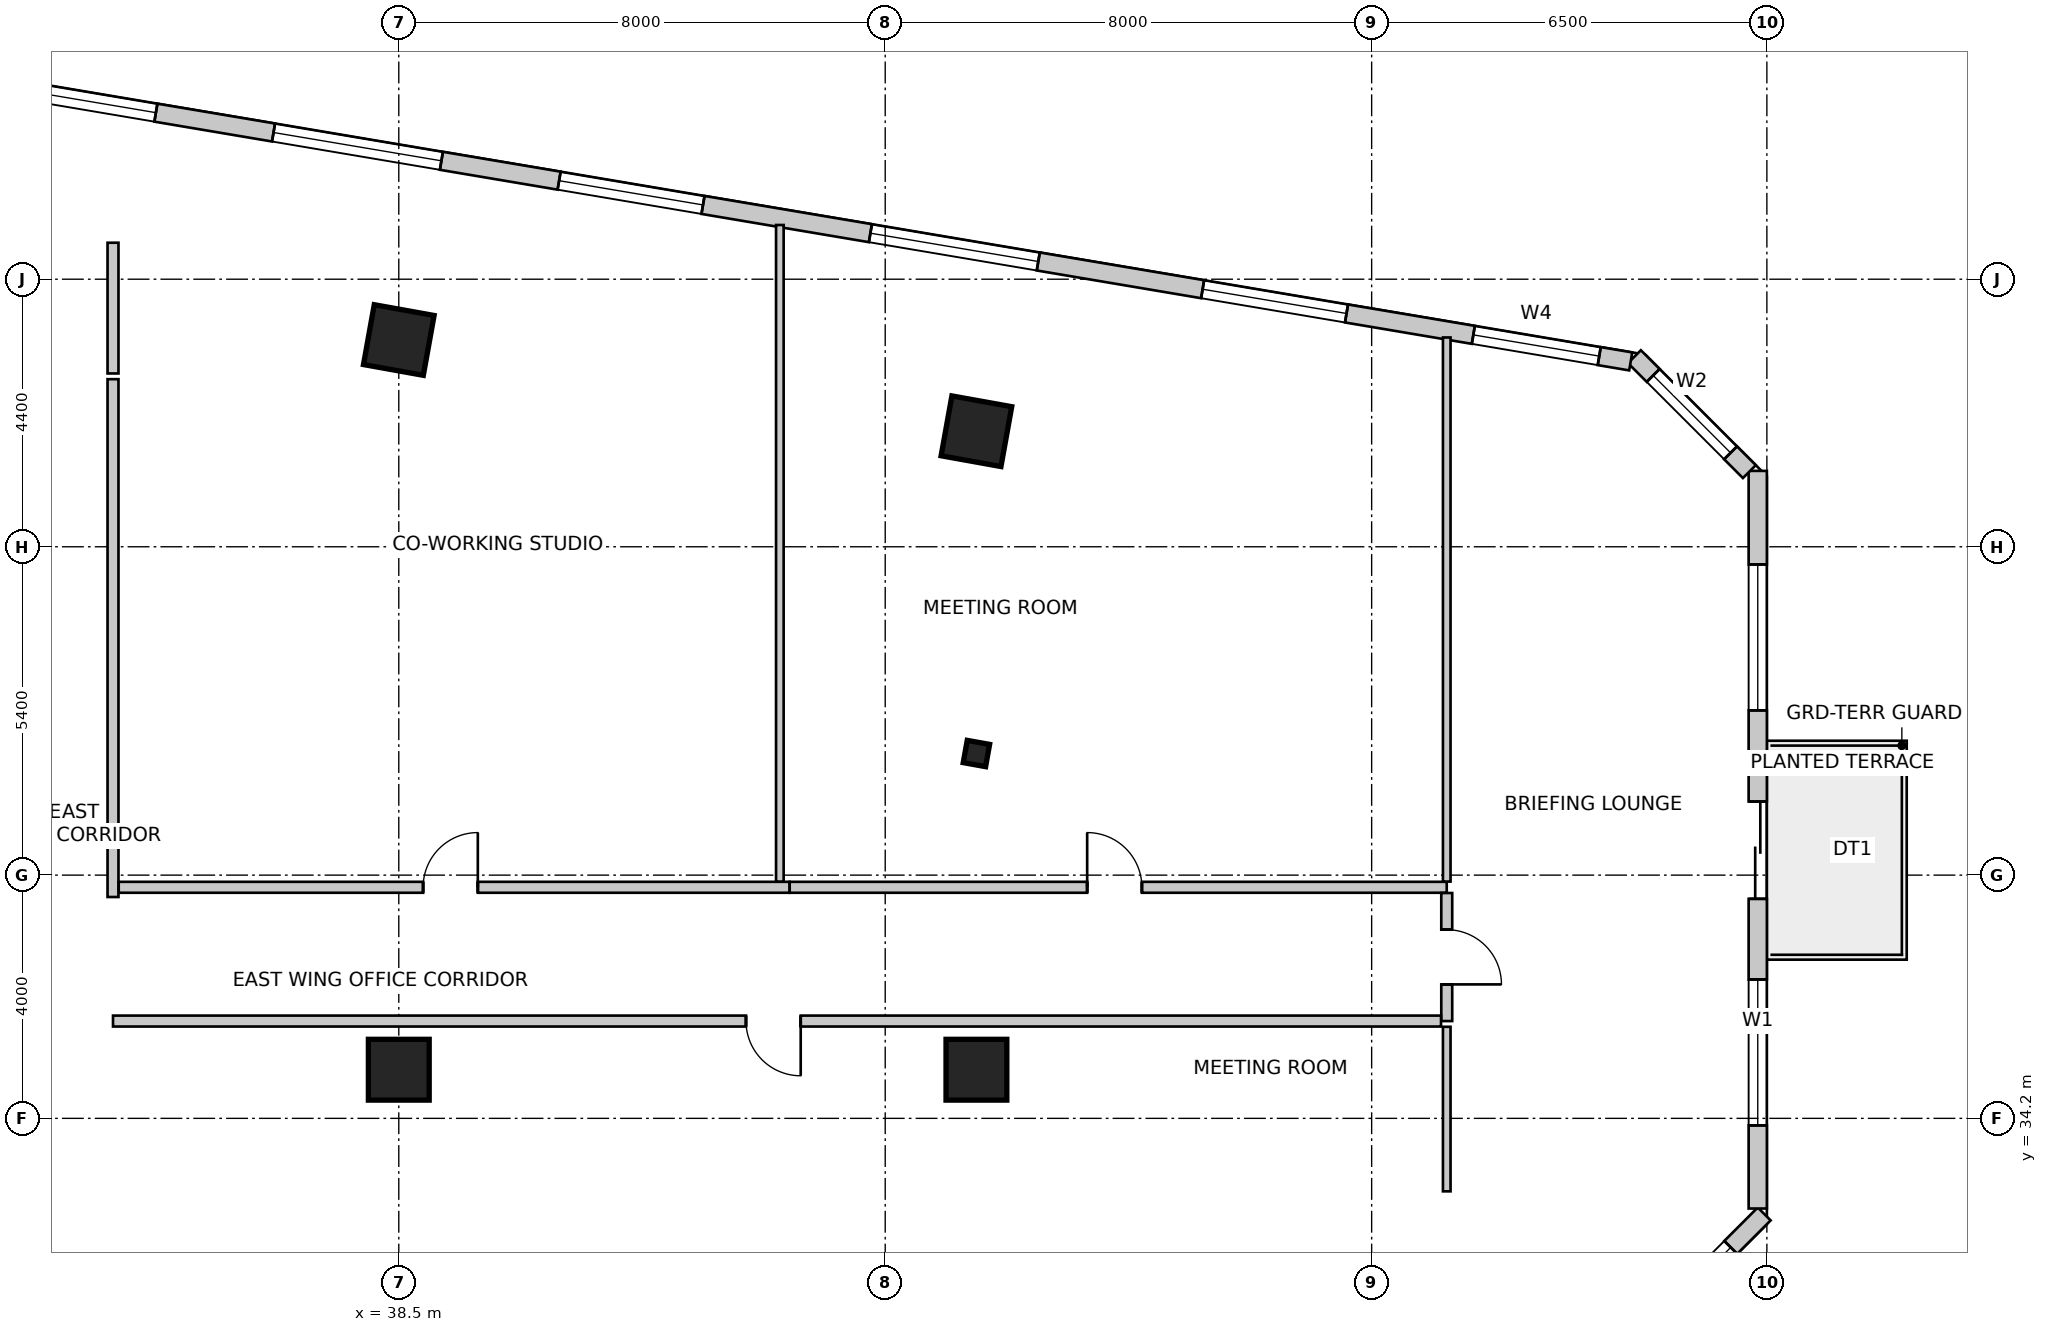
"""IFC4 building model, lengths in metres.
Left out: names, types, materials, properties, quantities, classifications, styles, units other than length and angle.
Written with IfcOpenShell. Run it as: python <this file> out.ifc"""

import sys

from ifc_helpers import new_model, si_unit, direction, frame, frame_2d, origin, origin_2d, place, context, subcontext, project, spatial, rectangle, i_section, extrude, source, transform, mapped, element, fill, save


model = new_model("IFC4")
c1 = context("Model", 3, precision=1e-05, world=origin(), true_north=direction((0.0, 1.0)))
c2 = subcontext(c1, "Body", "Model", "MODEL_VIEW")
j1 = project(units=[si_unit("LENGTHUNIT", "METRE"), si_unit("PLANEANGLEUNIT", "RADIAN")], contexts=[c1])
p1 = place(None, origin())
s1 = spatial("IfcSite", under=j1, at=p1, CompositionType="ELEMENT")
p2 = place(p1, origin())
s2 = spatial("IfcBuilding", under=s1, at=p2, CompositionType="ELEMENT")
p3 = place(p2, frame((0.0, 0.0, 31.0)))
s3 = spatial("IfcBuildingStorey", under=s2, at=p3, CompositionType="ELEMENT", Elevation=31.0)
m1 = source(origin(), c2, "Body", "SweptSolid", [
    extrude(rectangle(XDim=1.0, YDim=1.0, at=origin_2d()), origin(), (0.0, 0.0, 1.0), 4.0),
])
for number, where, z_axis, x_axis in (
    (1, (38.5, 47.0, 0.0), (0.0, 0.0, 1.0), (0.984, -0.177, 0.0)),
    (2, (48.0, 45.5, 0.0), (0.0, 0.0, 1.0), (0.984, -0.177, 0.0)),
    (3, (38.5, 35.0, 0.0), (0.0, 0.0, 1.0), (1.0, 0.0, 0.0)),
    (4, (48.0, 35.0, 0.0), (0.0, 0.0, 1.0), (1.0, 0.0, 0.0)),
):
    element("IfcColumn", number, at=place(p3, frame(where, z_axis=z_axis, x_axis=x_axis)), inside=s3, PredefinedType="COLUMN", context=c2, shape_type="MappedRepresentation", body=[
        mapped(m1, transform((0.0, 0.0, 0.0), scale=1.0)),
    ])
m2 = source(origin(), c2, "Body", "SweptSolid", [
    extrude(i_section(OverallWidth=0.374, OverallDepth=0.372, WebThickness=0.016, FlangeThickness=0.026, FilletRadius=0.015, at=origin_2d()), origin(), (0.0, 0.0, 1.0), 4.0),
])
p4 = place(p3, frame((48.0, 40.2, 0.0), z_axis=(0.0, 0.0, 1.0), x_axis=(0.984195607969, -0.17708474032, 0.0)))
e5 = element("IfcColumn", 5, at=p4, inside=s3, PredefinedType="COLUMN", context=c2, shape_type="MappedRepresentation", body=[
    mapped(m2, transform((0.0, 0.0, 0.0), scale=1.0)),
])
p5 = place(p3, frame((57.876, 29.548, 0.0), z_axis=(0.0, 0.0, 1.0), x_axis=(0.707106781187, 0.707106781187, 0.0)))
e6 = element("IfcWall", 6, at=p5, inside=s3, PredefinedType="SOLIDWALL", context=c2, shape_type="SweptSolid", body=[
    extrude(rectangle(XDim=4.356, YDim=0.3, at=frame_2d((2.178, 0.0))), origin(), (0.0, 0.0, 1.0), 3.75),
])
m3 = source(origin(), c2, "Body", "SweptSolid", [
    extrude(rectangle(XDim=2.8, YDim=2.4, at=frame_2d((1.4, 1.2))), frame((0.0, 0.16, 0.0), z_axis=(0.0, -1.0, 0.0), x_axis=(1.0, 0.0, 0.0)), (0.0, 0.0, 1.0), 0.32),
])
p6 = place(p5, frame((0.778, 0.0, 0.85)))
e7 = element("IfcOpeningElement", 7, at=p6, cuts=e6, PredefinedType="OPENING", context=c2, shape_type="MappedRepresentation", body=[
    mapped(m3, transform((0.0, 0.0, 0.0), scale=1.0)),
])
p7 = place(p3, frame((60.85, 32.717, 0.0), z_axis=(0.0, 0.0, 1.0), x_axis=(0.0, 1.0, 0.0)))
e8 = element("IfcWall", 8, at=p7, inside=s3, PredefinedType="SOLIDWALL", context=c2, shape_type="SweptSolid", body=[
    extrude(rectangle(XDim=12.131, YDim=0.3, at=frame_2d((6.065, 0.0))), origin(), (0.0, 0.0, 1.0), 3.75),
])
m4 = source(origin(), c2, "Body", "SweptSolid", [
    extrude(rectangle(XDim=1.6, YDim=2.15, at=frame_2d((0.8, 1.075))), frame((0.0, 0.16, 0.0), z_axis=(0.0, -1.0, 0.0), x_axis=(1.0, 0.0, 0.0)), (0.0, 0.0, 1.0), 0.32),
])
p8 = place(p7, frame((5.093, 0.0, 0.0)))
e9 = element("IfcOpeningElement", 9, at=p8, cuts=e8, PredefinedType="OPENING", context=c2, shape_type="MappedRepresentation", body=[
    mapped(m4, transform((0.0, 0.0, 0.0), scale=1.0)),
])
m5 = source(origin(), c2, "Body", "SweptSolid", [
    extrude(rectangle(XDim=2.4, YDim=2.2, at=frame_2d((1.2, 1.1))), frame((0.0, 0.16, 0.0), z_axis=(0.0, -1.0, 0.0), x_axis=(1.0, 0.0, 0.0)), (0.0, 0.0, 1.0), 0.32),
])
p9 = place(p7, frame((1.367, 0.0, 0.85)))
e10 = element("IfcOpeningElement", 10, at=p9, cuts=e8, PredefinedType="OPENING", context=c2, shape_type="MappedRepresentation", body=[
    mapped(m5, transform((0.0, 0.0, 0.0), scale=1.0)),
])
p10 = place(p7, frame((8.192, 0.0, 0.85)))
e11 = element("IfcOpeningElement", 11, at=p10, cuts=e8, PredefinedType="OPENING", context=c2, shape_type="MappedRepresentation", body=[
    mapped(m5, transform((0.0, 0.0, 0.0), scale=1.0)),
])
p11 = place(p3, frame((60.712, 44.836, 0.0), z_axis=(0.0, 0.0, 1.0), x_axis=(-0.707106781187, 0.707106781187, 0.0)))
e12 = element("IfcWall", 12, at=p11, inside=s3, PredefinedType="SOLIDWALL", context=c2, shape_type="SweptSolid", body=[
    extrude(rectangle(XDim=2.673, YDim=0.3, at=frame_2d((1.336, 0.0))), origin(), (0.0, 0.0, 1.0), 3.75),
])
m6 = source(origin(), c2, "Body", "SweptSolid", [
    extrude(rectangle(XDim=1.8, YDim=2.1, at=frame_2d((0.9, 1.05))), frame((0.0, 0.16, 0.0), z_axis=(0.0, -1.0, 0.0), x_axis=(1.0, 0.0, 0.0)), (0.0, 0.0, 1.0), 0.32),
])
p12 = place(p11, frame((0.437, 0.0, 0.85)))
e13 = element("IfcOpeningElement", 13, at=p12, cuts=e12, PredefinedType="OPENING", context=c2, shape_type="MappedRepresentation", body=[
    mapped(m6, transform((0.0, 0.0, 0.0), scale=1.0)),
])
p13 = place(p3, frame((58.761, 46.648, 0.0), z_axis=(0.0, 0.0, 1.0), x_axis=(-0.98607502735, 0.166301053624, 0.0)))
e14 = element("IfcWall", 14, at=p13, inside=s3, PredefinedType="SOLIDWALL", context=c2, shape_type="SweptSolid", body=[
    extrude(rectangle(XDim=37.397, YDim=0.3, at=frame_2d((18.699, 0.0))), origin(), (0.0, 0.0, 1.0), 3.75),
])
m7 = source(origin(), c2, "Body", "SweptSolid", [
    extrude(rectangle(XDim=2.1, YDim=2.0, at=frame_2d((1.05, 1.0))), frame((0.0, 0.16, 0.0), z_axis=(0.0, -1.0, 0.0), x_axis=(1.0, 0.0, 0.0)), (0.0, 0.0, 1.0), 0.32),
])
p14 = place(p13, frame((0.525, 0.0, 0.85)))
e15 = element("IfcOpeningElement", 15, at=p14, cuts=e14, PredefinedType="OPENING", context=c2, shape_type="MappedRepresentation", body=[
    mapped(m7, transform((0.0, 0.0, 0.0), scale=1.0)),
])
p15 = place(p13, frame((4.74, 0.0, 0.85)))
e16 = element("IfcOpeningElement", 16, at=p15, cuts=e14, PredefinedType="OPENING", context=c2, shape_type="MappedRepresentation", body=[
    mapped(m5, transform((0.0, 0.0, 0.0), scale=1.0)),
])
p16 = place(p13, frame((9.881, 0.0, 0.85)))
e17 = element("IfcOpeningElement", 17, at=p16, cuts=e14, PredefinedType="OPENING", context=c2, shape_type="MappedRepresentation", body=[
    mapped(m3, transform((0.0, 0.0, 0.0), scale=1.0)),
])
p17 = place(p13, frame((15.473, 0.0, 0.85)))
e18 = element("IfcOpeningElement", 18, at=p17, cuts=e14, PredefinedType="OPENING", context=c2, shape_type="MappedRepresentation", body=[
    mapped(m5, transform((0.0, 0.0, 0.0), scale=1.0)),
])
p18 = place(p13, frame((19.836, 0.0, 0.85)))
e19 = element("IfcOpeningElement", 19, at=p18, cuts=e14, PredefinedType="OPENING", context=c2, shape_type="MappedRepresentation", body=[
    mapped(m3, transform((0.0, 0.0, 0.0), scale=1.0)),
])
p19 = place(p13, frame((24.598, 0.0, 0.85)))
e20 = element("IfcOpeningElement", 20, at=p19, cuts=e14, PredefinedType="OPENING", context=c2, shape_type="MappedRepresentation", body=[
    mapped(m5, transform((0.0, 0.0, 0.0), scale=1.0)),
])
p20 = place(p13, frame((29.957, 0.0, 0.85)))
e21 = element("IfcOpeningElement", 21, at=p20, cuts=e14, PredefinedType="OPENING", context=c2, shape_type="MappedRepresentation", body=[
    mapped(m5, transform((0.0, 0.0, 0.0), scale=1.0)),
])
p21 = place(p13, frame((34.456, 0.0, 0.85)))
e22 = element("IfcOpeningElement", 22, at=p21, cuts=e14, PredefinedType="OPENING", context=c2, shape_type="MappedRepresentation", body=[
    mapped(m5, transform((0.0, 0.0, 0.0), scale=1.0)),
])
p22 = place(p3, frame((33.8, 48.6, 0.0), z_axis=(0.0, 0.0, 1.0), x_axis=(0.0, -1.0, 0.0)))
e23 = element("IfcWall", 23, at=p22, inside=s3, PredefinedType="PARTITIONING", context=c2, shape_type="SweptSolid", body=[
    extrude(rectangle(XDim=2.15, YDim=0.18, at=frame_2d((1.075, 0.0))), origin(), (0.0, 0.0, 1.0), 2.892),
])
p23 = place(p3, frame((33.8, 46.356, 0.0), z_axis=(0.0, 0.0, 1.0), x_axis=(0.0, -1.0, 0.0)))
e24 = element("IfcWall", 24, at=p23, inside=s3, PredefinedType="PARTITIONING", context=c2, shape_type="SweptSolid", body=[
    extrude(rectangle(XDim=8.516, YDim=0.18, at=frame_2d((4.258, 0.0))), origin(), (0.0, 0.0, 1.0), 3.279),
])
p24 = place(p3, frame((33.894, 38.0, 0.0), z_axis=(0.0, 0.0, 1.0), x_axis=(1.0, 0.0, 0.0)))
e25 = element("IfcWall", 25, at=p24, inside=s3, PredefinedType="PARTITIONING", context=c2, shape_type="SweptSolid", body=[
    extrude(rectangle(XDim=11.033, YDim=0.18, at=frame_2d((5.517, 0.0))), origin(), (0.0, 0.0, 1.0), 3.125),
])
m8 = source(origin(), c2, "Body", "SweptSolid", [
    extrude(rectangle(XDim=0.9, YDim=2.15, at=frame_2d((0.45, 1.075))), frame((0.0, 0.1, 0.0), z_axis=(0.0, -1.0, 0.0), x_axis=(1.0, 0.0, 0.0)), (0.0, 0.0, 1.0), 0.2),
])
p25 = place(p24, frame((5.006, 0.0, 0.0)))
e26 = element("IfcOpeningElement", 26, at=p25, cuts=e25, PredefinedType="OPENING", context=c2, shape_type="MappedRepresentation", body=[
    mapped(m8, transform((0.0, 0.0, 0.0), scale=1.0)),
])
p26 = place(p3, frame((44.929, 38.0, 0.0), z_axis=(0.0, 0.0, 1.0), x_axis=(1.0, 0.0, 0.0)))
e27 = element("IfcWall", 27, at=p26, inside=s3, PredefinedType="PARTITIONING", context=c2, shape_type="SweptSolid", body=[
    extrude(rectangle(XDim=10.806, YDim=0.18, at=frame_2d((5.403, 0.0))), origin(), (0.0, 0.0, 1.0), 3.125),
])
p27 = place(p26, frame((4.892, 0.0, 0.0)))
e28 = element("IfcOpeningElement", 28, at=p27, cuts=e27, PredefinedType="OPENING", context=c2, shape_type="MappedRepresentation", body=[
    mapped(m8, transform((0.0, 0.0, 0.0), scale=1.0)),
])
p28 = place(p3, frame((55.735, 37.906, 0.0), z_axis=(0.0, 0.0, 1.0), x_axis=(0.0, -1.0, 0.0)))
e29 = element("IfcWall", 29, at=p28, inside=s3, PredefinedType="PARTITIONING", context=c2, shape_type="SweptSolid", body=[
    extrude(rectangle(XDim=2.106, YDim=0.18, at=frame_2d((1.053, 0.0))), origin(), (0.0, 0.0, 1.0), 3.75),
])
p29 = place(p28, frame((0.603, 0.0, 0.0)))
e30 = element("IfcOpeningElement", 30, at=p29, cuts=e29, PredefinedType="OPENING", context=c2, shape_type="MappedRepresentation", body=[
    mapped(m8, transform((0.0, 0.0, 0.0), scale=1.0)),
])
p30 = place(p3, frame((55.641, 35.8, 0.0), z_axis=(0.0, 0.0, 1.0), x_axis=(-1.0, 0.0, 0.0)))
e31 = element("IfcWall", 31, at=p30, inside=s3, PredefinedType="PARTITIONING", context=c2, shape_type="SweptSolid", body=[
    extrude(rectangle(XDim=21.841, YDim=0.18, at=frame_2d((10.92, 0.0))), origin(), (0.0, 0.0, 1.0), 3.125),
])
p31 = place(p30, frame((10.531, 0.0, 0.0)))
e32 = element("IfcOpeningElement", 32, at=p31, cuts=e31, PredefinedType="OPENING", context=c2, shape_type="MappedRepresentation", body=[
    mapped(m8, transform((0.0, 0.0, 0.0), scale=1.0)),
])
p32 = place(p3, frame((44.767, 48.892, 0.0), z_axis=(0.0, 0.0, 1.0), x_axis=(0.0, -1.0, 0.0)))
e33 = element("IfcWall", 33, at=p32, inside=s3, PredefinedType="PARTITIONING", context=c2, shape_type="SweptSolid", body=[
    extrude(rectangle(XDim=10.798, YDim=0.125, at=frame_2d((5.399, 0.0))), origin(), (0.0, 0.0, 1.0), 2.892),
])
p33 = place(p3, frame((55.735, 47.042, 0.0), z_axis=(0.0, 0.0, 1.0), x_axis=(0.0, -1.0, 0.0)))
e34 = element("IfcWall", 34, at=p33, inside=s3, PredefinedType="PARTITIONING", context=c2, shape_type="SweptSolid", body=[
    extrude(rectangle(XDim=8.948, YDim=0.125, at=frame_2d((4.474, 0.0))), origin(), (0.0, 0.0, 1.0), 3.75),
])
p34 = place(p3, frame((55.735, 33.0, 0.0), z_axis=(0.0, 0.0, 1.0), x_axis=(0.0, 1.0, 0.0)))
e35 = element("IfcWall", 35, at=p34, inside=s3, PredefinedType="PARTITIONING", context=c2, shape_type="SweptSolid", body=[
    extrude(rectangle(XDim=2.706, YDim=0.125, at=frame_2d((1.353, 0.0))), origin(), (0.0, 0.0, 1.0), 3.75),
])
m9 = source(origin(), c2, "Body", "SweptSolid", [
    extrude(rectangle(XDim=2.8, YDim=2.4, at=frame_2d((1.4, 1.2))), frame((0.0, -0.015, 0.0), z_axis=(0.0, -1.0, 0.0), x_axis=(1.0, 0.0, 0.0)), (0.0, 0.0, 1.0), 0.06),
])
p35 = place(p6, origin())
e36 = element("IfcWindow", 36, at=p35, inside=s3, PartitioningType="SINGLE_PANEL", PredefinedType="WINDOW", context=c2, shape_type="MappedRepresentation", body=[
    mapped(m9, transform((0.0, 0.0, 0.0), scale=1.0)),
])
fill(e7, e36)
m10 = source(origin(), c2, "Body", "SweptSolid", [
    extrude(rectangle(XDim=1.6, YDim=2.15, at=frame_2d((0.8, 1.075))), frame((0.0, 0.025, 0.0), z_axis=(0.0, -1.0, 0.0), x_axis=(1.0, 0.0, 0.0)), (0.0, 0.0, 1.0), 0.05),
])
p36 = place(p8, origin())
e37 = element("IfcDoor", 37, at=p36, inside=s3, OperationType="DOUBLE_DOOR_SLIDING", PredefinedType="DOOR", context=c2, shape_type="MappedRepresentation", body=[
    mapped(m10, transform((0.0, 0.0, 0.0), scale=1.0)),
])
fill(e9, e37)
m11 = source(origin(), c2, "Body", "SweptSolid", [
    extrude(rectangle(XDim=2.4, YDim=2.2, at=frame_2d((1.2, 1.1))), frame((0.0, -0.015, 0.0), z_axis=(0.0, -1.0, 0.0), x_axis=(1.0, 0.0, 0.0)), (0.0, 0.0, 1.0), 0.06),
])
p37 = place(p9, origin())
e38 = element("IfcWindow", 38, at=p37, inside=s3, PartitioningType="SINGLE_PANEL", PredefinedType="WINDOW", context=c2, shape_type="MappedRepresentation", body=[
    mapped(m11, transform((0.0, 0.0, 0.0), scale=1.0)),
])
fill(e10, e38)
p38 = place(p10, origin())
e39 = element("IfcWindow", 39, at=p38, inside=s3, PartitioningType="SINGLE_PANEL", PredefinedType="WINDOW", context=c2, shape_type="MappedRepresentation", body=[
    mapped(m11, transform((0.0, 0.0, 0.0), scale=1.0)),
])
fill(e11, e39)
m12 = source(origin(), c2, "Body", "SweptSolid", [
    extrude(rectangle(XDim=1.8, YDim=2.1, at=frame_2d((0.9, 1.05))), frame((0.0, -0.015, 0.0), z_axis=(0.0, -1.0, 0.0), x_axis=(1.0, 0.0, 0.0)), (0.0, 0.0, 1.0), 0.06),
])
p39 = place(p12, origin())
e40 = element("IfcWindow", 40, at=p39, inside=s3, PartitioningType="SINGLE_PANEL", PredefinedType="WINDOW", context=c2, shape_type="MappedRepresentation", body=[
    mapped(m12, transform((0.0, 0.0, 0.0), scale=1.0)),
])
fill(e13, e40)
m13 = source(origin(), c2, "Body", "SweptSolid", [
    extrude(rectangle(XDim=2.1, YDim=2.0, at=frame_2d((1.05, 1.0))), frame((0.0, -0.015, 0.0), z_axis=(0.0, -1.0, 0.0), x_axis=(1.0, 0.0, 0.0)), (0.0, 0.0, 1.0), 0.06),
])
p40 = place(p14, origin())
e41 = element("IfcWindow", 41, at=p40, inside=s3, PartitioningType="SINGLE_PANEL", PredefinedType="WINDOW", context=c2, shape_type="MappedRepresentation", body=[
    mapped(m13, transform((0.0, 0.0, 0.0), scale=1.0)),
])
fill(e15, e41)
p41 = place(p15, origin())
e42 = element("IfcWindow", 42, at=p41, inside=s3, PartitioningType="SINGLE_PANEL", PredefinedType="WINDOW", context=c2, shape_type="MappedRepresentation", body=[
    mapped(m11, transform((0.0, 0.0, 0.0), scale=1.0)),
])
fill(e16, e42)
p42 = place(p16, origin())
e43 = element("IfcWindow", 43, at=p42, inside=s3, PartitioningType="SINGLE_PANEL", PredefinedType="WINDOW", context=c2, shape_type="MappedRepresentation", body=[
    mapped(m9, transform((0.0, 0.0, 0.0), scale=1.0)),
])
fill(e17, e43)
p43 = place(p17, origin())
e44 = element("IfcWindow", 44, at=p43, inside=s3, PartitioningType="SINGLE_PANEL", PredefinedType="WINDOW", context=c2, shape_type="MappedRepresentation", body=[
    mapped(m11, transform((0.0, 0.0, 0.0), scale=1.0)),
])
fill(e18, e44)
p44 = place(p18, origin())
e45 = element("IfcWindow", 45, at=p44, inside=s3, PartitioningType="SINGLE_PANEL", PredefinedType="WINDOW", context=c2, shape_type="MappedRepresentation", body=[
    mapped(m9, transform((0.0, 0.0, 0.0), scale=1.0)),
])
fill(e19, e45)
p45 = place(p19, origin())
e46 = element("IfcWindow", 46, at=p45, inside=s3, PartitioningType="SINGLE_PANEL", PredefinedType="WINDOW", context=c2, shape_type="MappedRepresentation", body=[
    mapped(m11, transform((0.0, 0.0, 0.0), scale=1.0)),
])
fill(e20, e46)
m14 = source(origin(), c2, "Body", "SweptSolid", [
    extrude(rectangle(XDim=0.9, YDim=2.15, at=frame_2d((0.45, 1.075))), frame((0.0, 0.025, 0.0), z_axis=(0.0, -1.0, 0.0), x_axis=(1.0, 0.0, 0.0)), (0.0, 0.0, 1.0), 0.05),
])
p46 = place(p25, origin())
e47 = element("IfcDoor", 47, at=p46, inside=s3, OperationType="SINGLE_SWING_RIGHT", PredefinedType="DOOR", context=c2, shape_type="MappedRepresentation", body=[
    mapped(m14, transform((0.0, 0.0, 0.0), scale=1.0)),
])
fill(e26, e47)
p47 = place(p27, origin())
e48 = element("IfcDoor", 48, at=p47, inside=s3, OperationType="SINGLE_SWING_LEFT", PredefinedType="DOOR", context=c2, shape_type="MappedRepresentation", body=[
    mapped(m14, transform((0.0, 0.0, 0.0), scale=1.0)),
])
fill(e28, e48)
p48 = place(p29, origin())
e49 = element("IfcDoor", 49, at=p48, inside=s3, OperationType="SINGLE_SWING_RIGHT", PredefinedType="DOOR", context=c2, shape_type="MappedRepresentation", body=[
    mapped(m14, transform((0.0, 0.0, 0.0), scale=1.0)),
])
fill(e30, e49)
p49 = place(p31, origin())
e50 = element("IfcDoor", 50, at=p49, inside=s3, OperationType="SINGLE_SWING_LEFT", PredefinedType="DOOR", context=c2, shape_type="MappedRepresentation", body=[
    mapped(m14, transform((0.0, 0.0, 0.0), scale=1.0)),
])
fill(e32, e50)
save(model, sys.argv[1])
